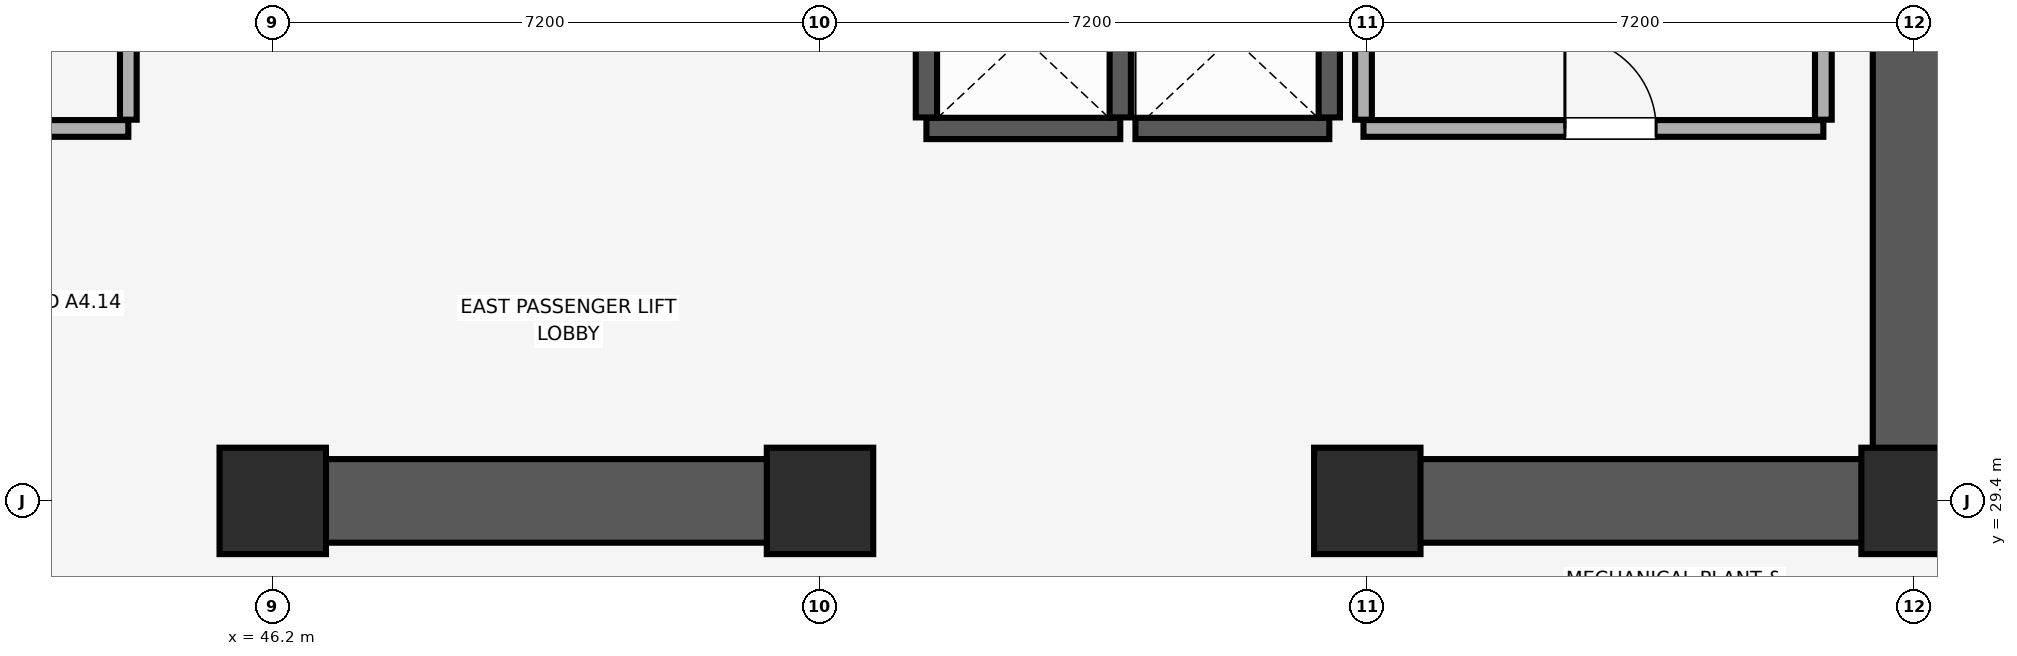
"""IFC4 building model, lengths in metres.
Left out: names, types, materials, properties, quantities, classifications, styles, units other than length and angle.
Written with IfcOpenShell. Run it as: python <this file> out.ifc"""

import sys

from ifc_helpers import new_model, si_unit, direction, frame, frame_2d, origin, origin_2d, place, context, subcontext, project, spatial, rectangle, extrude, element, fill, save


model = new_model("IFC4")
c1 = context("Model", 3, precision=1e-05, world=origin(), true_north=direction((0.0, 1.0)))
c2 = subcontext(c1, "Body", "Model", "MODEL_VIEW")
j1 = project(units=[si_unit("LENGTHUNIT", "METRE"), si_unit("PLANEANGLEUNIT", "RADIAN")], contexts=[c1])
p1 = place(None, origin())
s1 = spatial("IfcSite", under=j1, at=p1, CompositionType="ELEMENT")
p2 = place(p1, origin())
s2 = spatial("IfcBuilding", under=s1, at=p2, CompositionType="ELEMENT")
p3 = place(p2, frame((0.0, 0.0, 80.15)))
s3 = spatial("IfcBuildingStorey", under=s2, at=p3, CompositionType="ELEMENT", Elevation=80.15)
for number, where, z_axis, x_axis in (
    (1, (46.2, 29.4, 0.0), (0.0, 0.0, 1.0), (1.0, 0.0, 0.0)),
    (2, (53.4, 29.4, 0.0), (0.0, 0.0, 1.0), (1.0, 0.0, 0.0)),
    (3, (60.6, 29.4, 0.0), (0.0, 0.0, 1.0), (1.0, 0.0, 0.0)),
    (4, (67.8, 29.4, 0.0), (0.0, 0.0, 1.0), (1.0, 0.0, 0.0)),
):
    element("IfcColumn", number, at=place(p3, frame(where, z_axis=z_axis, x_axis=x_axis)), inside=s3, PredefinedType="COLUMN", context=c2, shape_type="SweptSolid", body=[
        extrude(rectangle(XDim=1.4, YDim=1.4, at=origin_2d()), origin(), (0.0, 0.0, 1.0), 5.16),
    ])
p4 = place(p3, frame((67.8, 29.4, 0.0), z_axis=(0.0, 0.0, 1.0), x_axis=(0.0, 1.0, 0.0)))
e5 = element("IfcWall", 5, at=p4, inside=s3, PredefinedType="SHEAR", context=c2, shape_type="SweptSolid", body=[
    extrude(rectangle(XDim=19.2, YDim=1.1, at=frame_2d((9.6, 0.0))), origin(), (0.0, 0.0, 1.0), 5.16),
])
p5 = place(p3, frame((46.0, 29.4, 0.0), z_axis=(0.0, 0.0, 1.0), x_axis=(1.0, 0.0, 0.0)))
e6 = element("IfcWall", 6, at=p5, inside=s3, PredefinedType="SHEAR", context=c2, shape_type="SweptSolid", body=[
    extrude(rectangle(XDim=7.6, YDim=1.1, at=frame_2d((3.8, 0.0))), origin(), (0.0, 0.0, 1.0), 5.16),
])
p6 = place(p3, frame((60.4, 29.4, 0.0), z_axis=(0.0, 0.0, 1.0), x_axis=(1.0, 0.0, 0.0)))
e7 = element("IfcWall", 7, at=p6, inside=s3, PredefinedType="SHEAR", context=c2, shape_type="SweptSolid", body=[
    extrude(rectangle(XDim=6.845, YDim=1.1, at=frame_2d((3.423, 0.0))), origin(), (0.0, 0.0, 1.0), 5.16),
])
p7 = place(p3, frame((54.8, 34.3, 0.0), z_axis=(0.0, 0.0, 1.0), x_axis=(1.0, 0.0, 0.0)))
e8 = element("IfcWall", 8, at=p7, inside=s3, PredefinedType="SHEAR", context=c2, shape_type="SweptSolid", body=[
    extrude(rectangle(XDim=2.55, YDim=0.28, at=frame_2d((1.275, 0.0))), origin(), (0.0, 0.0, 1.0), 5.16),
])
for number, where, z_axis, x_axis in (
    (9, (54.8, 34.445, 0.0), (0.0, 0.0, 1.0), (0.0, 1.0, 0.0)),
    (10, (57.35, 34.445, 0.0), (0.0, 0.0, 1.0), (0.0, 1.0, 0.0)),
):
    element("IfcWall", number, at=place(p3, frame(where, z_axis=z_axis, x_axis=x_axis)), inside=s3, PredefinedType="SHEAR", context=c2, shape_type="SweptSolid", body=[
        extrude(rectangle(XDim=2.11, YDim=0.28, at=frame_2d((1.055, 0.0))), origin(), (0.0, 0.0, 1.0), 5.16),
    ])
p8 = place(p3, frame((57.55, 34.3, 0.0), z_axis=(0.0, 0.0, 1.0), x_axis=(1.0, 0.0, 0.0)))
e11 = element("IfcWall", 11, at=p8, inside=s3, PredefinedType="SHEAR", context=c2, shape_type="SweptSolid", body=[
    extrude(rectangle(XDim=2.55, YDim=0.28, at=frame_2d((1.275, 0.0))), origin(), (0.0, 0.0, 1.0), 5.16),
])
p9 = place(p3, frame((60.1, 34.445, 0.0), z_axis=(0.0, 0.0, 1.0), x_axis=(0.0, 1.0, 0.0)))
e12 = element("IfcWall", 12, at=p9, inside=s3, PredefinedType="SHEAR", context=c2, shape_type="SweptSolid", body=[
    extrude(rectangle(XDim=2.11, YDim=0.28, at=frame_2d((1.055, 0.0))), origin(), (0.0, 0.0, 1.0), 5.16),
])
p10 = place(p3, frame((60.55, 34.3, 0.0), z_axis=(0.0, 0.0, 1.0), x_axis=(1.0, 0.0, 0.0)))
e13 = element("IfcWall", 13, at=p10, inside=s3, PredefinedType="PARTITIONING", context=c2, shape_type="SweptSolid", body=[
    extrude(rectangle(XDim=6.05, YDim=0.22, at=frame_2d((3.025, 0.0))), origin(), (0.0, 0.0, 1.0), 5.16),
])
p11 = place(p10, frame((2.65, 0.0, 0.0)))
e14 = element("IfcOpeningElement", 14, at=p11, cuts=e13, PredefinedType="OPENING", context=c2, shape_type="SweptSolid", body=[
    extrude(rectangle(XDim=1.2, YDim=2.15, at=frame_2d((0.6, 1.075))), frame((0.0, 0.12, 0.0), z_axis=(0.0, -1.0, 0.0), x_axis=(1.0, 0.0, 0.0)), (0.0, 0.0, 1.0), 0.24),
])
p12 = place(p3, frame((60.55, 34.415, 0.0), z_axis=(0.0, 0.0, 1.0), x_axis=(0.0, 1.0, 0.0)))
e15 = element("IfcWall", 15, at=p12, inside=s3, PredefinedType="PARTITIONING", context=c2, shape_type="SweptSolid", body=[
    extrude(rectangle(XDim=5.64, YDim=0.22, at=frame_2d((2.82, 0.0))), origin(), (0.0, 0.0, 1.0), 5.16),
])
p13 = place(p3, frame((66.6, 34.415, 0.0), z_axis=(0.0, 0.0, 1.0), x_axis=(0.0, 1.0, 0.0)))
e16 = element("IfcWall", 16, at=p13, inside=s3, PredefinedType="PARTITIONING", context=c2, shape_type="SweptSolid", body=[
    extrude(rectangle(XDim=5.43, YDim=0.22, at=frame_2d((2.715, 0.0))), origin(), (0.0, 0.0, 1.0), 5.16),
])
p14 = place(p3, frame((39.7, 34.3, 0.0), z_axis=(0.0, 0.0, 1.0), x_axis=(1.0, 0.0, 0.0)))
e17 = element("IfcWall", 17, at=p14, inside=s3, PredefinedType="PARTITIONING", context=c2, shape_type="SweptSolid", body=[
    extrude(rectangle(XDim=4.6, YDim=0.22, at=frame_2d((2.3, 0.0))), origin(), (0.0, 0.0, 1.0), 5.16),
])
p15 = place(p14, frame((1.7, 0.0, 0.0)))
e18 = element("IfcOpeningElement", 18, at=p15, cuts=e17, PredefinedType="OPENING", context=c2, shape_type="SweptSolid", body=[
    extrude(rectangle(XDim=1.2, YDim=2.15, at=frame_2d((0.6, 1.075))), frame((0.0, 0.12, 0.0), z_axis=(0.0, -1.0, 0.0), x_axis=(1.0, 0.0, 0.0)), (0.0, 0.0, 1.0), 0.24),
])
p16 = place(p3, frame((44.3, 34.415, 0.0), z_axis=(0.0, 0.0, 1.0), x_axis=(0.0, 1.0, 0.0)))
e19 = element("IfcWall", 19, at=p16, inside=s3, PredefinedType="PARTITIONING", context=c2, shape_type="SweptSolid", body=[
    extrude(rectangle(XDim=5.785, YDim=0.22, at=frame_2d((2.893, 0.0))), origin(), (0.0, 0.0, 1.0), 5.16),
])
p17 = place(p11, origin())
e20 = element("IfcDoor", 20, at=p17, inside=s3, OperationType="SINGLE_SWING_LEFT", PredefinedType="DOOR", context=c2, shape_type="SweptSolid", body=[
    extrude(rectangle(XDim=1.2, YDim=2.15, at=frame_2d((0.6, 1.075))), frame((0.0, 0.025, 0.0), z_axis=(0.0, -1.0, 0.0), x_axis=(1.0, 0.0, 0.0)), (0.0, 0.0, 1.0), 0.05),
])
fill(e14, e20)
save(model, sys.argv[1])
